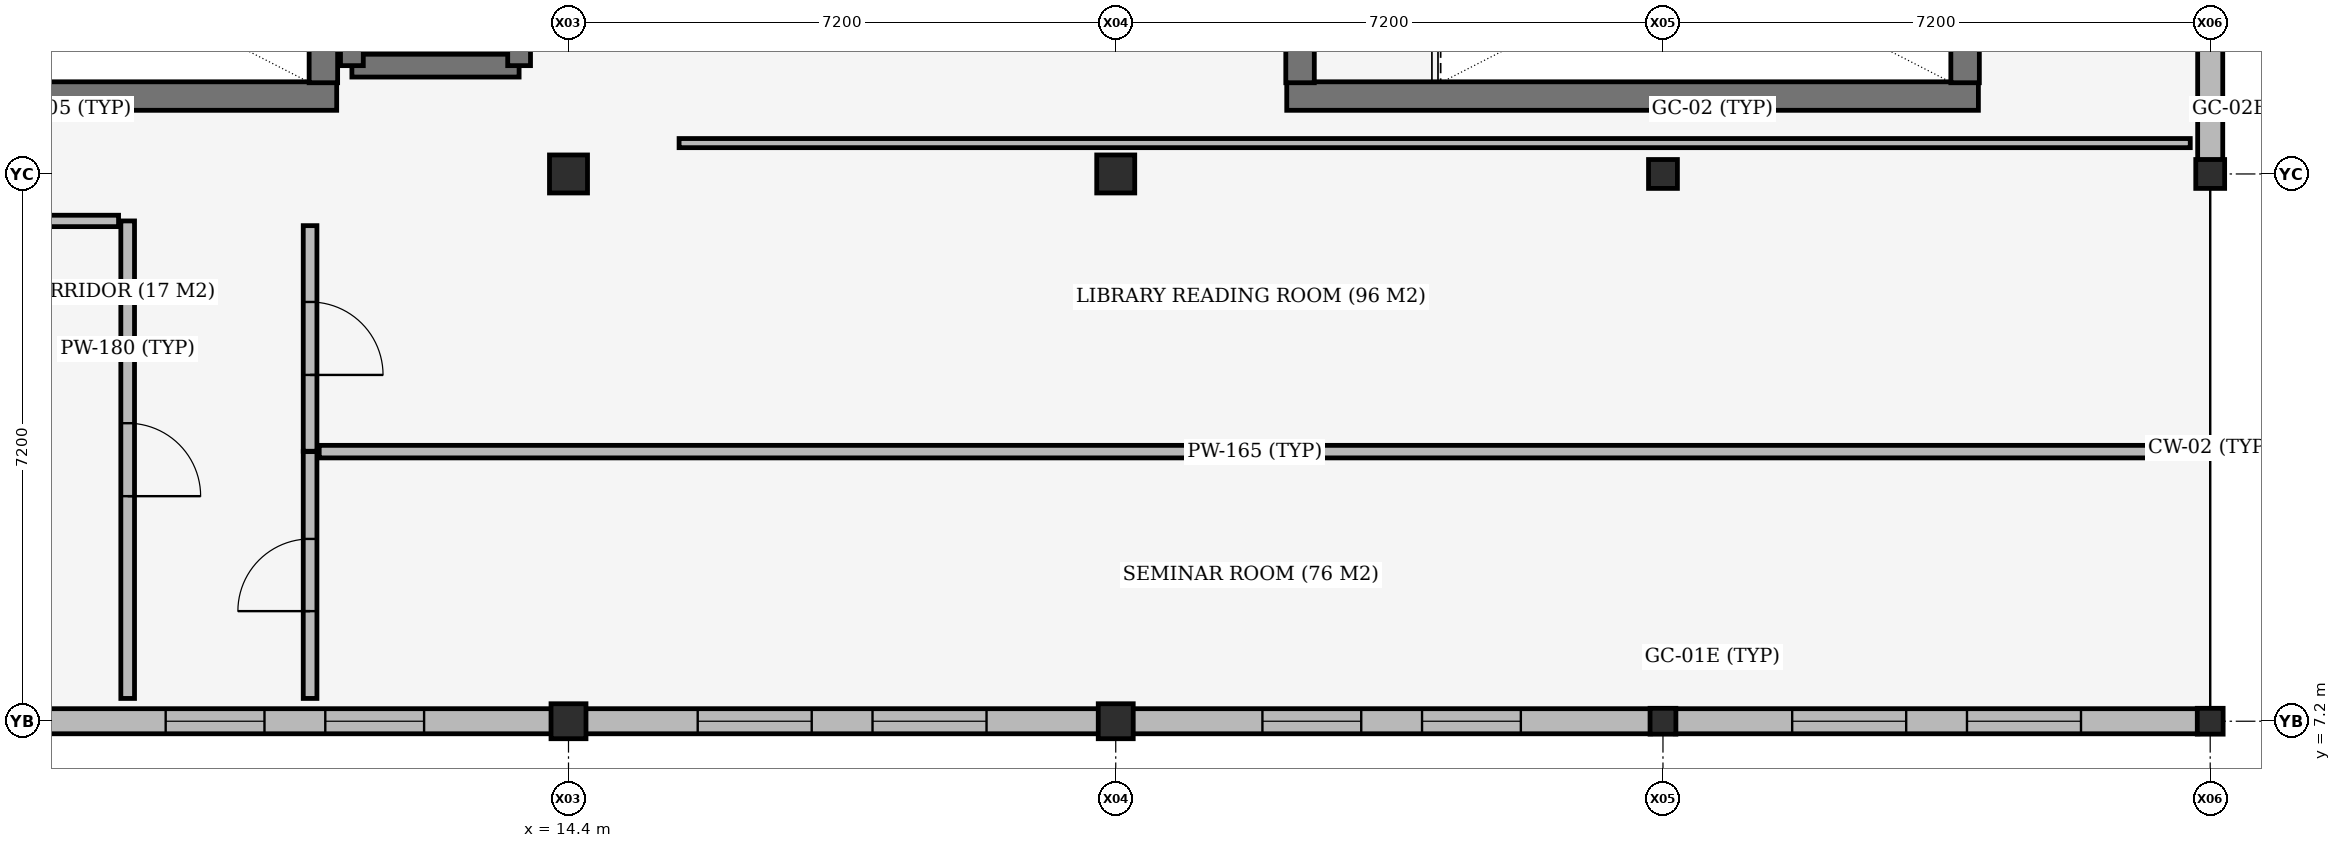
"""IFC4 building model, lengths in metres.
Left out: names, types, materials, properties, quantities, classifications, styles, units other than length and angle.
Written with IfcOpenShell. Run it as: python <this file> out.ifc"""

import sys

from ifc_helpers import new_model, si_unit, direction, frame, frame_2d, origin, origin_2d, place, context, subcontext, project, spatial, rectangle, extrude, element, fill, save


model = new_model("IFC4")
c1 = context("Model", 3, precision=1e-05, world=origin(), true_north=direction((0.0, 1.0)))
c2 = subcontext(c1, "Body", "Model", "MODEL_VIEW")
j1 = project(units=[si_unit("LENGTHUNIT", "METRE"), si_unit("PLANEANGLEUNIT", "RADIAN")], contexts=[c1])
p1 = place(None, origin())
s1 = spatial("IfcSite", under=j1, at=p1, CompositionType="ELEMENT")
p2 = place(p1, origin())
s2 = spatial("IfcBuilding", under=s1, at=p2, CompositionType="ELEMENT")
p3 = place(p2, frame((0.0, 0.0, 22.2)))
s3 = spatial("IfcBuildingStorey", under=s2, at=p3, CompositionType="ELEMENT", Elevation=22.2)
p4 = place(p3, frame((14.4, 7.2, 0.0), z_axis=(0.0, 0.0, 1.0), x_axis=(1.0, 0.0, 0.0)))
e1 = element("IfcColumn", 1, at=p4, inside=s3, PredefinedType="COLUMN", context=c2, shape_type="SweptSolid", body=[
    extrude(rectangle(XDim=0.46, YDim=0.46, at=origin_2d()), origin(), (0.0, 0.0, 1.0), 3.96),
])
p5 = place(p3, frame((14.4, 14.4, 0.0), z_axis=(0.0, 0.0, 1.0), x_axis=(1.0, 0.0, 0.0)))
e2 = element("IfcColumn", 2, at=p5, inside=s3, PredefinedType="COLUMN", context=c2, shape_type="SweptSolid", body=[
    extrude(rectangle(XDim=0.5, YDim=0.5, at=origin_2d()), origin(), (0.0, 0.0, 1.0), 3.96),
])
p6 = place(p3, frame((21.6, 7.2, 0.0), z_axis=(0.0, 0.0, 1.0), x_axis=(1.0, 0.0, 0.0)))
e3 = element("IfcColumn", 3, at=p6, inside=s3, PredefinedType="COLUMN", context=c2, shape_type="SweptSolid", body=[
    extrude(rectangle(XDim=0.46, YDim=0.46, at=origin_2d()), origin(), (0.0, 0.0, 1.0), 3.96),
])
p7 = place(p3, frame((21.6, 14.4, 0.0), z_axis=(0.0, 0.0, 1.0), x_axis=(1.0, 0.0, 0.0)))
e4 = element("IfcColumn", 4, at=p7, inside=s3, PredefinedType="COLUMN", context=c2, shape_type="SweptSolid", body=[
    extrude(rectangle(XDim=0.5, YDim=0.5, at=origin_2d()), origin(), (0.0, 0.0, 1.0), 3.96),
])
p8 = place(p3, frame((28.8, 7.2, 0.0), z_axis=(0.0, 0.0, 1.0), x_axis=(1.0, 0.0, 0.0)))
e5 = element("IfcColumn", 5, at=p8, inside=s3, PredefinedType="COLUMN", context=c2, shape_type="SweptSolid", body=[
    extrude(rectangle(XDim=0.34, YDim=0.34, at=origin_2d()), origin(), (0.0, 0.0, 1.0), 3.96),
])
p9 = place(p3, frame((28.8, 14.4, 0.0), z_axis=(0.0, 0.0, 1.0), x_axis=(1.0, 0.0, 0.0)))
e6 = element("IfcColumn", 6, at=p9, inside=s3, PredefinedType="COLUMN", context=c2, shape_type="SweptSolid", body=[
    extrude(rectangle(XDim=0.38, YDim=0.38, at=origin_2d()), origin(), (0.0, 0.0, 1.0), 3.96),
])
p10 = place(p3, frame((36.0, 7.2, 0.0), z_axis=(0.0, 0.0, 1.0), x_axis=(1.0, 0.0, 0.0)))
e7 = element("IfcColumn", 7, at=p10, inside=s3, PredefinedType="COLUMN", context=c2, shape_type="SweptSolid", body=[
    extrude(rectangle(XDim=0.34, YDim=0.34, at=origin_2d()), origin(), (0.0, 0.0, 1.0), 3.96),
])
p11 = place(p3, frame((36.0, 14.4, 0.0), z_axis=(0.0, 0.0, 1.0), x_axis=(1.0, 0.0, 0.0)))
e8 = element("IfcColumn", 8, at=p11, inside=s3, PredefinedType="COLUMN", context=c2, shape_type="SweptSolid", body=[
    extrude(rectangle(XDim=0.38, YDim=0.38, at=origin_2d()), origin(), (0.0, 0.0, 1.0), 3.96),
])
p12 = place(p3, frame((2.25, 15.425, 0.0), z_axis=(0.0, 0.0, 1.0), x_axis=(1.0, 0.0, 0.0)))
e9 = element("IfcWall", 9, at=p12, inside=s3, PredefinedType="SHEAR", context=c2, shape_type="SweptSolid", body=[
    extrude(rectangle(XDim=9.1, YDim=0.375, at=frame_2d((4.55, 0.0))), origin(), (0.0, 0.0, 1.0), 3.96),
])
p13 = place(p3, frame((11.175, 15.6, 0.0), z_axis=(0.0, 0.0, 1.0), x_axis=(0.0, 1.0, 0.0)))
e10 = element("IfcWall", 10, at=p13, inside=s3, PredefinedType="SHEAR", context=c2, shape_type="SweptSolid", body=[
    extrude(rectangle(XDim=3.45, YDim=0.375, at=frame_2d((1.725, 0.0))), origin(), (0.0, 0.0, 1.0), 3.96),
])
p14 = place(p3, frame((23.85, 15.425, 0.0), z_axis=(0.0, 0.0, 1.0), x_axis=(1.0, 0.0, 0.0)))
e11 = element("IfcWall", 11, at=p14, inside=s3, PredefinedType="SHEAR", context=c2, shape_type="SweptSolid", body=[
    extrude(rectangle(XDim=9.1, YDim=0.375, at=frame_2d((4.55, 0.0))), origin(), (0.0, 0.0, 1.0), 3.96),
])
p15 = place(p3, frame((32.775, 15.6, 0.0), z_axis=(0.0, 0.0, 1.0), x_axis=(0.0, 1.0, 0.0)))
e12 = element("IfcWall", 12, at=p15, inside=s3, PredefinedType="SHEAR", context=c2, shape_type="SweptSolid", body=[
    extrude(rectangle(XDim=3.45, YDim=0.375, at=frame_2d((1.725, 0.0))), origin(), (0.0, 0.0, 1.0), 3.96),
])
p16 = place(p3, frame((11.55, 15.825, 0.0), z_axis=(0.0, 0.0, 1.0), x_axis=(1.0, 0.0, 0.0)))
e13 = element("IfcWall", 13, at=p16, inside=s3, PredefinedType="SHEAR", context=c2, shape_type="SweptSolid", body=[
    extrude(rectangle(XDim=2.2, YDim=0.3, at=frame_2d((1.1, 0.0))), origin(), (0.0, 0.0, 1.0), 4.86),
])
for number, where, z_axis, x_axis in (
    (14, (11.55, 18.825, 0.0), (0.0, 0.0, 1.0), (0.0, -1.0, 0.0)),
    (15, (13.75, 15.825, 0.0), (0.0, 0.0, 1.0), (0.0, 1.0, 0.0)),
):
    element("IfcWall", number, at=place(p3, frame(where, z_axis=z_axis, x_axis=x_axis)), inside=s3, PredefinedType="SHEAR", context=c2, shape_type="SweptSolid", body=[
        extrude(rectangle(XDim=3.0, YDim=0.3, at=frame_2d((1.5, 0.0))), origin(), (0.0, 0.0, 1.0), 4.86),
    ])
p17 = place(p3, frame((14.178, 7.2, 0.0), z_axis=(0.0, 0.0, 1.0), x_axis=(-1.0, 0.0, 0.0)))
e16 = element("IfcWall", 16, at=p17, inside=s3, PredefinedType="STANDARD", context=c2, shape_type="SweptSolid", body=[
    extrude(rectangle(XDim=6.756, YDim=0.33, at=frame_2d((3.378, 0.0))), origin(), (0.0, 0.0, 1.0), 3.34),
])
p18 = place(p17, frame((1.678, 0.0, 0.95)))
e17 = element("IfcOpeningElement", 17, at=p18, cuts=e16, PredefinedType="OPENING", context=c2, shape_type="SweptSolid", body=[
    extrude(rectangle(XDim=1.3, YDim=1.8, at=frame_2d((0.65, 0.9))), frame((0.0, 0.175, 0.0), z_axis=(0.0, -1.0, 0.0), x_axis=(1.0, 0.0, 0.0)), (0.0, 0.0, 1.0), 0.35),
])
p19 = place(p17, frame((3.778, 0.0, 0.95)))
e18 = element("IfcOpeningElement", 18, at=p19, cuts=e16, PredefinedType="OPENING", context=c2, shape_type="SweptSolid", body=[
    extrude(rectangle(XDim=1.3, YDim=1.8, at=frame_2d((0.65, 0.9))), frame((0.0, 0.175, 0.0), z_axis=(0.0, -1.0, 0.0), x_axis=(1.0, 0.0, 0.0)), (0.0, 0.0, 1.0), 0.35),
])
p20 = place(p3, frame((21.378, 7.2, 0.0), z_axis=(0.0, 0.0, 1.0), x_axis=(-1.0, 0.0, 0.0)))
e19 = element("IfcWall", 19, at=p20, inside=s3, PredefinedType="STANDARD", context=c2, shape_type="SweptSolid", body=[
    extrude(rectangle(XDim=6.756, YDim=0.33, at=frame_2d((3.378, 0.0))), origin(), (0.0, 0.0, 1.0), 3.28),
])
p21 = place(p20, frame((1.478, 0.0, 0.95)))
e20 = element("IfcOpeningElement", 20, at=p21, cuts=e19, PredefinedType="OPENING", context=c2, shape_type="SweptSolid", body=[
    extrude(rectangle(XDim=1.5, YDim=1.8, at=frame_2d((0.75, 0.9))), frame((0.0, 0.175, 0.0), z_axis=(0.0, -1.0, 0.0), x_axis=(1.0, 0.0, 0.0)), (0.0, 0.0, 1.0), 0.35),
])
p22 = place(p20, frame((3.778, 0.0, 0.95)))
e21 = element("IfcOpeningElement", 21, at=p22, cuts=e19, PredefinedType="OPENING", context=c2, shape_type="SweptSolid", body=[
    extrude(rectangle(XDim=1.5, YDim=1.8, at=frame_2d((0.75, 0.9))), frame((0.0, 0.175, 0.0), z_axis=(0.0, -1.0, 0.0), x_axis=(1.0, 0.0, 0.0)), (0.0, 0.0, 1.0), 0.35),
])
p23 = place(p3, frame((28.638, 7.2, 0.0), z_axis=(0.0, 0.0, 1.0), x_axis=(-1.0, 0.0, 0.0)))
e22 = element("IfcWall", 22, at=p23, inside=s3, PredefinedType="STANDARD", context=c2, shape_type="SweptSolid", body=[
    extrude(rectangle(XDim=6.816, YDim=0.33, at=frame_2d((3.408, 0.0))), origin(), (0.0, 0.0, 1.0), 3.48),
])
p24 = place(p23, frame((1.708, 0.0, 0.95)))
e23 = element("IfcOpeningElement", 23, at=p24, cuts=e22, PredefinedType="OPENING", context=c2, shape_type="SweptSolid", body=[
    extrude(rectangle(XDim=1.3, YDim=1.8, at=frame_2d((0.65, 0.9))), frame((0.0, 0.175, 0.0), z_axis=(0.0, -1.0, 0.0), x_axis=(1.0, 0.0, 0.0)), (0.0, 0.0, 1.0), 0.35),
])
p25 = place(p23, frame((3.808, 0.0, 0.95)))
e24 = element("IfcOpeningElement", 24, at=p25, cuts=e22, PredefinedType="OPENING", context=c2, shape_type="SweptSolid", body=[
    extrude(rectangle(XDim=1.3, YDim=1.8, at=frame_2d((0.65, 0.9))), frame((0.0, 0.175, 0.0), z_axis=(0.0, -1.0, 0.0), x_axis=(1.0, 0.0, 0.0)), (0.0, 0.0, 1.0), 0.35),
])
p26 = place(p3, frame((35.838, 7.2, 0.0), z_axis=(0.0, 0.0, 1.0), x_axis=(-1.0, 0.0, 0.0)))
e25 = element("IfcWall", 25, at=p26, inside=s3, PredefinedType="STANDARD", context=c2, shape_type="SweptSolid", body=[
    extrude(rectangle(XDim=6.876, YDim=0.33, at=frame_2d((3.438, 0.0))), origin(), (0.0, 0.0, 1.0), 3.41),
])
p27 = place(p26, frame((1.538, 0.0, 0.95)))
e26 = element("IfcOpeningElement", 26, at=p27, cuts=e25, PredefinedType="OPENING", context=c2, shape_type="SweptSolid", body=[
    extrude(rectangle(XDim=1.5, YDim=1.8, at=frame_2d((0.75, 0.9))), frame((0.0, 0.175, 0.0), z_axis=(0.0, -1.0, 0.0), x_axis=(1.0, 0.0, 0.0)), (0.0, 0.0, 1.0), 0.35),
])
p28 = place(p26, frame((3.838, 0.0, 0.95)))
e27 = element("IfcOpeningElement", 27, at=p28, cuts=e25, PredefinedType="OPENING", context=c2, shape_type="SweptSolid", body=[
    extrude(rectangle(XDim=1.5, YDim=1.8, at=frame_2d((0.75, 0.9))), frame((0.0, 0.175, 0.0), z_axis=(0.0, -1.0, 0.0), x_axis=(1.0, 0.0, 0.0)), (0.0, 0.0, 1.0), 0.35),
])
p29 = place(p3, frame((36.0, 21.398, 0.0), z_axis=(0.0, 0.0, 1.0), x_axis=(0.0, -1.0, 0.0)))
e28 = element("IfcWall", 28, at=p29, inside=s3, PredefinedType="STANDARD", context=c2, shape_type="SweptSolid", body=[
    extrude(rectangle(XDim=6.816, YDim=0.33, at=frame_2d((3.408, 0.0))), origin(), (0.0, 0.0, 1.0), 3.96),
])
p30 = place(p29, frame((1.708, 0.0, 0.95)))
e29 = element("IfcOpeningElement", 29, at=p30, cuts=e28, PredefinedType="OPENING", context=c2, shape_type="SweptSolid", body=[
    extrude(rectangle(XDim=1.3, YDim=1.8, at=frame_2d((0.65, 0.9))), frame((0.0, 0.175, 0.0), z_axis=(0.0, -1.0, 0.0), x_axis=(1.0, 0.0, 0.0)), (0.0, 0.0, 1.0), 0.35),
])
p31 = place(p29, frame((3.808, 0.0, 0.95)))
e30 = element("IfcOpeningElement", 30, at=p31, cuts=e28, PredefinedType="OPENING", context=c2, shape_type="SweptSolid", body=[
    extrude(rectangle(XDim=1.3, YDim=1.8, at=frame_2d((0.65, 0.9))), frame((0.0, 0.175, 0.0), z_axis=(0.0, -1.0, 0.0), x_axis=(1.0, 0.0, 0.0)), (0.0, 0.0, 1.0), 0.35),
])
p32 = place(p3, frame((0.13, 7.33, 4.2), z_axis=(0.0, 0.0, 1.0), x_axis=(1.0, 0.0, 0.0)))
e31 = element("IfcWall", 31, at=p32, inside=s3, PredefinedType="PARAPET", context=c2, shape_type="SweptSolid", body=[
    extrude(rectangle(XDim=35.74, YDim=0.245, at=frame_2d((17.87, 0.0))), origin(), (0.0, 0.0, 1.0), 0.95),
])
p33 = place(p3, frame((35.87, 7.33, 4.2), z_axis=(0.0, 0.0, 1.0), x_axis=(0.0, 1.0, 0.0)))
e32 = element("IfcWall", 32, at=p33, inside=s3, PredefinedType="PARAPET", context=c2, shape_type="SweptSolid", body=[
    extrude(rectangle(XDim=53.74, YDim=0.245, at=frame_2d((26.87, 0.0))), origin(), (0.0, 0.0, 1.0), 0.95),
])
p34 = place(p3, frame((24.025, 19.05, 0.0), z_axis=(0.0, 0.0, 1.0), x_axis=(0.0, -1.0, 0.0)))
e33 = element("IfcWall", 33, at=p34, inside=s3, PredefinedType="SHEAR", context=c2, shape_type="SweptSolid", body=[
    extrude(rectangle(XDim=3.45, YDim=0.375, at=frame_2d((1.725, 0.0))), origin(), (0.0, 0.0, 1.0), 3.96),
])
p35 = place(p34, frame((1.035, 0.0, 0.0)))
e34 = element("IfcOpeningElement", 34, at=p35, cuts=e33, PredefinedType="OPENING", context=c2, shape_type="SweptSolid", body=[
    extrude(rectangle(XDim=1.38, YDim=2.2, at=frame_2d((0.69, 1.1))), frame((0.0, 0.198, 0.0), z_axis=(0.0, -1.0, 0.0), x_axis=(1.0, 0.0, 0.0)), (0.0, 0.0, 1.0), 0.395),
])
p36 = place(p3, frame((8.6, 7.5, 0.0), z_axis=(0.0, 0.0, 1.0), x_axis=(0.0, 1.0, 0.0)))
e35 = element("IfcWall", 35, at=p36, inside=s3, PredefinedType="PARTITIONING", context=c2, shape_type="SweptSolid", body=[
    extrude(rectangle(XDim=6.282, YDim=0.18, at=frame_2d((3.141, 0.0))), origin(), (0.0, 0.0, 1.0), 3.96),
])
p37 = place(p36, frame((2.661, 0.0, 0.0)))
e36 = element("IfcOpeningElement", 36, at=p37, cuts=e35, PredefinedType="OPENING", context=c2, shape_type="SweptSolid", body=[
    extrude(rectangle(XDim=0.96, YDim=2.15, at=frame_2d((0.48, 1.075))), frame((0.0, 0.1, 0.0), z_axis=(0.0, -1.0, 0.0), x_axis=(1.0, 0.0, 0.0)), (0.0, 0.0, 1.0), 0.2),
])
p38 = place(p3, frame((0.25, 13.782, 0.0), z_axis=(0.0, 0.0, 1.0), x_axis=(1.0, 0.0, 0.0)))
e37 = element("IfcWall", 37, at=p38, inside=s3, PredefinedType="PARTITIONING", context=c2, shape_type="SweptSolid", body=[
    extrude(rectangle(XDim=8.23, YDim=0.15, at=frame_2d((4.115, 0.0))), origin(), (0.0, 0.0, 1.0), 3.96),
])
p39 = place(p3, frame((11.0, 7.5, 0.0), z_axis=(0.0, 0.0, 1.0), x_axis=(0.0, 1.0, 0.0)))
e38 = element("IfcWall", 38, at=p39, inside=s3, PredefinedType="PARTITIONING", context=c2, shape_type="SweptSolid", body=[
    extrude(rectangle(XDim=3.247, YDim=0.18, at=frame_2d((1.624, 0.0))), origin(), (0.0, 0.0, 1.0), 3.96),
])
p40 = place(p39, frame((1.148, 0.0, 0.0)))
e39 = element("IfcOpeningElement", 39, at=p40, cuts=e38, PredefinedType="OPENING", context=c2, shape_type="SweptSolid", body=[
    extrude(rectangle(XDim=0.95, YDim=2.15, at=frame_2d((0.475, 1.075))), frame((0.0, 0.1, 0.0), z_axis=(0.0, -1.0, 0.0), x_axis=(1.0, 0.0, 0.0)), (0.0, 0.0, 1.0), 0.2),
])
p41 = place(p3, frame((11.12, 10.747, 0.0), z_axis=(0.0, 0.0, 1.0), x_axis=(1.0, 0.0, 0.0)))
e40 = element("IfcWall", 40, at=p41, inside=s3, PredefinedType="PARTITIONING", context=c2, shape_type="SweptSolid", body=[
    extrude(rectangle(XDim=24.617, YDim=0.165, at=frame_2d((12.309, 0.0))), origin(), (0.0, 0.0, 1.0), 3.96),
])
p42 = place(p3, frame((11.0, 10.752, 0.0), z_axis=(0.0, 0.0, 1.0), x_axis=(0.0, 1.0, 0.0)))
e41 = element("IfcWall", 41, at=p42, inside=s3, PredefinedType="PARTITIONING", context=c2, shape_type="SweptSolid", body=[
    extrude(rectangle(XDim=2.968, YDim=0.18, at=frame_2d((1.484, 0.0))), origin(), (0.0, 0.0, 1.0), 3.96),
])
p43 = place(p42, frame((1.004, 0.0, 0.0)))
e42 = element("IfcOpeningElement", 42, at=p43, cuts=e41, PredefinedType="OPENING", context=c2, shape_type="SweptSolid", body=[
    extrude(rectangle(XDim=0.96, YDim=2.15, at=frame_2d((0.48, 1.075))), frame((0.0, 0.1, 0.0), z_axis=(0.0, -1.0, 0.0), x_axis=(1.0, 0.0, 0.0)), (0.0, 0.0, 1.0), 0.2),
])
p44 = place(p3, frame((15.855, 14.806, 0.0), z_axis=(0.0, 0.0, 1.0), x_axis=(1.0, 0.0, 0.0)))
e43 = element("IfcWall", 43, at=p44, inside=s3, PredefinedType="PARTITIONING", context=c2, shape_type="SweptSolid", body=[
    extrude(rectangle(XDim=19.883, YDim=0.12, at=frame_2d((9.941, 0.0))), origin(), (0.0, 0.0, 1.0), 3.96),
])
p45 = place(p18, origin())
e44 = element("IfcWindow", 44, at=p45, inside=s3, PartitioningType="DOUBLE_PANEL_VERTICAL", PredefinedType="WINDOW", context=c2, shape_type="SweptSolid", body=[
    extrude(rectangle(XDim=1.3, YDim=1.8, at=frame_2d((0.65, 0.9))), frame((0.0, 0.03, 0.0), z_axis=(0.0, -1.0, 0.0), x_axis=(1.0, 0.0, 0.0)), (0.0, 0.0, 1.0), 0.06),
])
fill(e17, e44)
p46 = place(p19, origin())
e45 = element("IfcWindow", 45, at=p46, inside=s3, PartitioningType="DOUBLE_PANEL_VERTICAL", PredefinedType="WINDOW", context=c2, shape_type="SweptSolid", body=[
    extrude(rectangle(XDim=1.3, YDim=1.8, at=frame_2d((0.65, 0.9))), frame((0.0, 0.03, 0.0), z_axis=(0.0, -1.0, 0.0), x_axis=(1.0, 0.0, 0.0)), (0.0, 0.0, 1.0), 0.06),
])
fill(e18, e45)
p47 = place(p21, origin())
e46 = element("IfcWindow", 46, at=p47, inside=s3, PartitioningType="DOUBLE_PANEL_VERTICAL", PredefinedType="WINDOW", context=c2, shape_type="SweptSolid", body=[
    extrude(rectangle(XDim=1.5, YDim=1.8, at=frame_2d((0.75, 0.9))), frame((0.0, 0.03, 0.0), z_axis=(0.0, -1.0, 0.0), x_axis=(1.0, 0.0, 0.0)), (0.0, 0.0, 1.0), 0.06),
])
fill(e20, e46)
p48 = place(p22, origin())
e47 = element("IfcWindow", 47, at=p48, inside=s3, PartitioningType="DOUBLE_PANEL_VERTICAL", PredefinedType="WINDOW", context=c2, shape_type="SweptSolid", body=[
    extrude(rectangle(XDim=1.5, YDim=1.8, at=frame_2d((0.75, 0.9))), frame((0.0, 0.03, 0.0), z_axis=(0.0, -1.0, 0.0), x_axis=(1.0, 0.0, 0.0)), (0.0, 0.0, 1.0), 0.06),
])
fill(e21, e47)
p49 = place(p24, origin())
e48 = element("IfcWindow", 48, at=p49, inside=s3, PartitioningType="DOUBLE_PANEL_VERTICAL", PredefinedType="WINDOW", context=c2, shape_type="SweptSolid", body=[
    extrude(rectangle(XDim=1.3, YDim=1.8, at=frame_2d((0.65, 0.9))), frame((0.0, 0.03, 0.0), z_axis=(0.0, -1.0, 0.0), x_axis=(1.0, 0.0, 0.0)), (0.0, 0.0, 1.0), 0.06),
])
fill(e23, e48)
p50 = place(p25, origin())
e49 = element("IfcWindow", 49, at=p50, inside=s3, PartitioningType="DOUBLE_PANEL_VERTICAL", PredefinedType="WINDOW", context=c2, shape_type="SweptSolid", body=[
    extrude(rectangle(XDim=1.3, YDim=1.8, at=frame_2d((0.65, 0.9))), frame((0.0, 0.03, 0.0), z_axis=(0.0, -1.0, 0.0), x_axis=(1.0, 0.0, 0.0)), (0.0, 0.0, 1.0), 0.06),
])
fill(e24, e49)
p51 = place(p27, origin())
e50 = element("IfcWindow", 50, at=p51, inside=s3, PartitioningType="DOUBLE_PANEL_VERTICAL", PredefinedType="WINDOW", context=c2, shape_type="SweptSolid", body=[
    extrude(rectangle(XDim=1.5, YDim=1.8, at=frame_2d((0.75, 0.9))), frame((0.0, 0.03, 0.0), z_axis=(0.0, -1.0, 0.0), x_axis=(1.0, 0.0, 0.0)), (0.0, 0.0, 1.0), 0.06),
])
fill(e26, e50)
p52 = place(p28, origin())
e51 = element("IfcWindow", 51, at=p52, inside=s3, PartitioningType="DOUBLE_PANEL_VERTICAL", PredefinedType="WINDOW", context=c2, shape_type="SweptSolid", body=[
    extrude(rectangle(XDim=1.5, YDim=1.8, at=frame_2d((0.75, 0.9))), frame((0.0, 0.03, 0.0), z_axis=(0.0, -1.0, 0.0), x_axis=(1.0, 0.0, 0.0)), (0.0, 0.0, 1.0), 0.06),
])
fill(e27, e51)
p53 = place(p37, origin())
e52 = element("IfcDoor", 52, at=p53, inside=s3, OperationType="SINGLE_SWING_RIGHT", PredefinedType="DOOR", context=c2, shape_type="SweptSolid", body=[
    extrude(rectangle(XDim=0.96, YDim=2.15, at=frame_2d((0.48, 1.075))), frame((0.0, 0.025, 0.0), z_axis=(0.0, -1.0, 0.0), x_axis=(1.0, 0.0, 0.0)), (0.0, 0.0, 1.0), 0.05),
])
fill(e36, e52)
p54 = place(p40, origin())
e53 = element("IfcDoor", 53, at=p54, inside=s3, OperationType="SINGLE_SWING_LEFT", PredefinedType="DOOR", context=c2, shape_type="SweptSolid", body=[
    extrude(rectangle(XDim=0.95, YDim=2.15, at=frame_2d((0.475, 1.075))), frame((0.0, 0.025, 0.0), z_axis=(0.0, -1.0, 0.0), x_axis=(1.0, 0.0, 0.0)), (0.0, 0.0, 1.0), 0.05),
])
fill(e39, e53)
p55 = place(p43, origin())
e54 = element("IfcDoor", 54, at=p55, inside=s3, OperationType="SINGLE_SWING_RIGHT", PredefinedType="DOOR", context=c2, shape_type="SweptSolid", body=[
    extrude(rectangle(XDim=0.96, YDim=2.15, at=frame_2d((0.48, 1.075))), frame((0.0, 0.025, 0.0), z_axis=(0.0, -1.0, 0.0), x_axis=(1.0, 0.0, 0.0)), (0.0, 0.0, 1.0), 0.05),
])
fill(e42, e54)
save(model, sys.argv[1])
